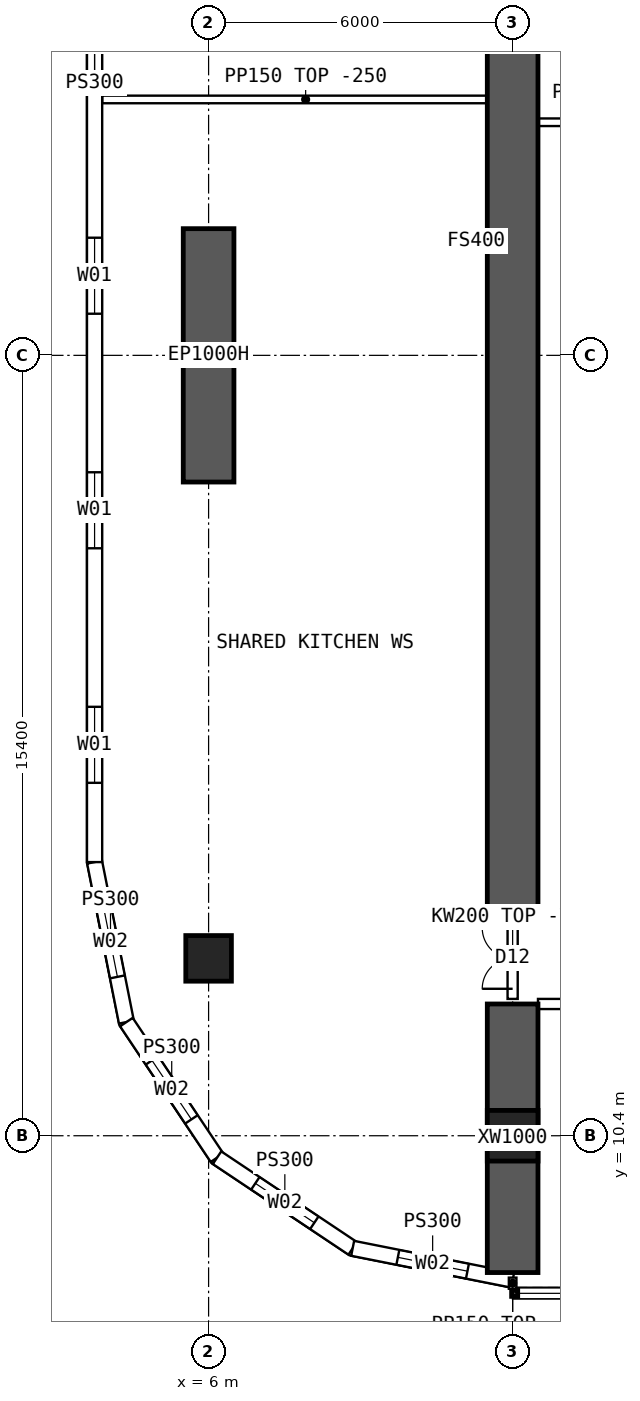
"""IFC4 building model, lengths in metres.
Left out: names, types, materials, properties, quantities, classifications, styles, units other than length and angle.
Written with IfcOpenShell. Run it as: python <this file> out.ifc"""

import sys

from ifc_helpers import new_model, si_unit, direction, frame, frame_2d, origin, origin_2d, place, context, subcontext, project, spatial, polyline, rectangle, hollow_rectangle, outline, extrude, element, fill, save


model = new_model("IFC4")
c1 = context("Model", 3, precision=1e-05, world=origin(), true_north=direction((0.0, 1.0)))
c2 = subcontext(c1, "Body", "Model", "MODEL_VIEW")
j1 = project(units=[si_unit("LENGTHUNIT", "METRE"), si_unit("PLANEANGLEUNIT", "RADIAN")], contexts=[c1])
p1 = place(None, origin())
s1 = spatial("IfcSite", under=j1, at=p1, CompositionType="ELEMENT")
p2 = place(p1, origin())
s2 = spatial("IfcBuilding", under=s1, at=p2, CompositionType="ELEMENT")
p3 = place(p2, frame((0.0, 0.0, 16.0)))
s3 = spatial("IfcBuildingStorey", under=s2, at=p3, CompositionType="ELEMENT", Elevation=16.0)
p4 = place(p3, frame((12.0, 10.4, 0.0), z_axis=(0.0, 0.0, 1.0), x_axis=(1.0, 0.0, 0.0)))
e1 = element("IfcColumn", 1, at=p4, inside=s3, PredefinedType="COLUMN", context=c2, shape_type="SweptSolid", body=[
    extrude(hollow_rectangle(XDim=1.0, YDim=1.0, WallThickness=0.1, at=origin_2d()), origin(), (0.0, 0.0, 1.0), 4.2),
])
p5 = place(p3, frame((6.0, 13.9, 0.0), z_axis=(0.0, 0.0, 1.0), x_axis=(1.0, 0.0, 0.0)))
e2 = element("IfcColumn", 2, at=p5, inside=s3, PredefinedType="COLUMN", context=c2, shape_type="SweptSolid", body=[
    extrude(hollow_rectangle(XDim=0.9, YDim=0.9, WallThickness=0.09, at=origin_2d()), origin(), (0.0, 0.0, 1.0), 4.2),
])
p6 = place(p3, frame((6.0, 23.3, 0.0), z_axis=(0.0, 0.0, 1.0), x_axis=(0.0, 1.0, 0.0)))
e3 = element("IfcWall", 3, at=p6, inside=s3, PredefinedType="SHEAR", context=c2, shape_type="SweptSolid", body=[
    extrude(rectangle(XDim=5.0, YDim=1.0, at=frame_2d((2.5, 0.0))), origin(), (0.0, 0.0, 1.0), 4.2),
])
p7 = place(p3, frame((12.0, 7.7, 0.0), z_axis=(0.0, 0.0, 1.0), x_axis=(0.0, 1.0, 0.0)))
e4 = element("IfcWall", 4, at=p7, inside=s3, PredefinedType="SHEAR", context=c2, shape_type="SweptSolid", body=[
    extrude(rectangle(XDim=5.3, YDim=1.0, at=frame_2d((2.65, 0.0))), origin(), (0.0, 0.0, 1.0), 4.2),
])
p8 = place(p3, frame((12.0, 14.8, 0.0), z_axis=(0.0, 0.0, 1.0), x_axis=(0.0, 1.0, 0.0)))
e5 = element("IfcWall", 5, at=p8, inside=s3, PredefinedType="SHEAR", context=c2, shape_type="SweptSolid", body=[
    extrude(rectangle(XDim=34.4, YDim=1.0, at=frame_2d((17.2, 0.0))), origin(), (0.0, 0.0, 1.0), 4.2),
])
p9 = place(p3, frame((3.75, 48.2, 0.0), z_axis=(0.0, 0.0, 1.0), x_axis=(0.0, -1.0, 0.0)))
e6 = element("IfcWall", 6, at=p9, inside=s3, PredefinedType="SOLIDWALL", context=c2, shape_type="SweptSolid", body=[
    extrude(outline(polyline([(-0.015, -0.15), (32.415, -0.15), (32.385, 0.15), (0.015, 0.15), (-0.015, -0.15)])), origin(), (0.0, 0.0, 1.0), 3.95),
])
p10 = place(p9, frame((1.564, 0.0, 0.9)))
e7 = element("IfcOpeningElement", 7, at=p10, cuts=e6, PredefinedType="OPENING", context=c2, shape_type="SweptSolid", body=[
    extrude(rectangle(XDim=1.5, YDim=2.0, at=frame_2d((0.75, 1.0))), frame((0.0, 0.16, 0.0), z_axis=(0.0, -1.0, 0.0), x_axis=(1.0, 0.0, 0.0)), (0.0, 0.0, 1.0), 0.32),
])
p11 = place(p9, frame((6.193, 0.0, 0.9)))
e8 = element("IfcOpeningElement", 8, at=p11, cuts=e6, PredefinedType="OPENING", context=c2, shape_type="SweptSolid", body=[
    extrude(rectangle(XDim=1.5, YDim=2.0, at=frame_2d((0.75, 1.0))), frame((0.0, 0.16, 0.0), z_axis=(0.0, -1.0, 0.0), x_axis=(1.0, 0.0, 0.0)), (0.0, 0.0, 1.0), 0.32),
])
p12 = place(p9, frame((10.822, 0.0, 0.9)))
e9 = element("IfcOpeningElement", 9, at=p12, cuts=e6, PredefinedType="OPENING", context=c2, shape_type="SweptSolid", body=[
    extrude(rectangle(XDim=1.5, YDim=2.0, at=frame_2d((0.75, 1.0))), frame((0.0, 0.16, 0.0), z_axis=(0.0, -1.0, 0.0), x_axis=(1.0, 0.0, 0.0)), (0.0, 0.0, 1.0), 0.32),
])
p13 = place(p9, frame((15.45, 0.0, 0.9)))
e10 = element("IfcOpeningElement", 10, at=p13, cuts=e6, PredefinedType="OPENING", context=c2, shape_type="SweptSolid", body=[
    extrude(rectangle(XDim=1.5, YDim=2.0, at=frame_2d((0.75, 1.0))), frame((0.0, 0.16, 0.0), z_axis=(0.0, -1.0, 0.0), x_axis=(1.0, 0.0, 0.0)), (0.0, 0.0, 1.0), 0.32),
])
p14 = place(p9, frame((20.079, 0.0, 0.9)))
e11 = element("IfcOpeningElement", 11, at=p14, cuts=e6, PredefinedType="OPENING", context=c2, shape_type="SweptSolid", body=[
    extrude(rectangle(XDim=1.5, YDim=2.0, at=frame_2d((0.75, 1.0))), frame((0.0, 0.16, 0.0), z_axis=(0.0, -1.0, 0.0), x_axis=(1.0, 0.0, 0.0)), (0.0, 0.0, 1.0), 0.32),
])
p15 = place(p9, frame((24.707, 0.0, 0.9)))
e12 = element("IfcOpeningElement", 12, at=p15, cuts=e6, PredefinedType="OPENING", context=c2, shape_type="SweptSolid", body=[
    extrude(rectangle(XDim=1.5, YDim=2.0, at=frame_2d((0.75, 1.0))), frame((0.0, 0.16, 0.0), z_axis=(0.0, -1.0, 0.0), x_axis=(1.0, 0.0, 0.0)), (0.0, 0.0, 1.0), 0.32),
])
p16 = place(p9, frame((29.336, 0.0, 0.9)))
e13 = element("IfcOpeningElement", 13, at=p16, cuts=e6, PredefinedType="OPENING", context=c2, shape_type="SweptSolid", body=[
    extrude(rectangle(XDim=1.5, YDim=2.0, at=frame_2d((0.75, 1.0))), frame((0.0, 0.16, 0.0), z_axis=(0.0, -1.0, 0.0), x_axis=(1.0, 0.0, 0.0)), (0.0, 0.0, 1.0), 0.32),
])
p17 = place(p3, frame((3.75, 15.8, 0.0), z_axis=(0.0, 0.0, 1.0), x_axis=(0.195065901187, -0.980790137692, 0.0)))
e14 = element("IfcWall", 14, at=p17, inside=s3, PredefinedType="SOLIDWALL", context=c2, shape_type="SweptSolid", body=[
    extrude(outline(polyline([(-0.015, -0.15), (3.249, -0.15), (3.189, 0.15), (0.015, 0.15), (-0.015, -0.15)])), origin(), (0.0, 0.0, 1.0), 3.95),
])
p18 = place(p17, frame((0.909, 0.0, 0.9)))
e15 = element("IfcOpeningElement", 15, at=p18, cuts=e14, PredefinedType="OPENING", context=c2, shape_type="SweptSolid", body=[
    extrude(rectangle(XDim=1.4, YDim=1.8, at=frame_2d((0.7, 0.9))), frame((0.0, 0.16, 0.0), z_axis=(0.0, -1.0, 0.0), x_axis=(1.0, 0.0, 0.0)), (0.0, 0.0, 1.0), 0.32),
])
p19 = place(p3, frame((4.378, 12.643, 0.0), z_axis=(0.0, 0.0, 1.0), x_axis=(0.555609954424, -0.831443069936, 0.0)))
e16 = element("IfcWall", 16, at=p19, inside=s3, PredefinedType="SOLIDWALL", context=c2, shape_type="SweptSolid", body=[
    extrude(outline(polyline([(-0.03, -0.15), (3.249, -0.15), (3.189, 0.15), (0.03, 0.15), (-0.03, -0.15)])), origin(), (0.0, 0.0, 1.0), 3.95),
])
p20 = place(p19, frame((0.909, 0.0, 0.9)))
e17 = element("IfcOpeningElement", 17, at=p20, cuts=e16, PredefinedType="OPENING", context=c2, shape_type="SweptSolid", body=[
    extrude(rectangle(XDim=1.4, YDim=1.8, at=frame_2d((0.7, 0.9))), frame((0.0, 0.16, 0.0), z_axis=(0.0, -1.0, 0.0), x_axis=(1.0, 0.0, 0.0)), (0.0, 0.0, 1.0), 0.32),
])
p21 = place(p3, frame((6.167, 9.966, 0.0), z_axis=(0.0, 0.0, 1.0), x_axis=(0.831478105043, -0.555557522525, 0.0)))
e18 = element("IfcWall", 18, at=p21, inside=s3, PredefinedType="SOLIDWALL", context=c2, shape_type="SweptSolid", body=[
    extrude(outline(polyline([(-0.03, -0.15), (3.249, -0.15), (3.189, 0.15), (0.03, 0.15), (-0.03, -0.15)])), origin(), (0.0, 0.0, 1.0), 3.95),
])
p22 = place(p21, frame((0.909, 0.0, 0.9)))
e19 = element("IfcOpeningElement", 19, at=p22, cuts=e18, PredefinedType="OPENING", context=c2, shape_type="SweptSolid", body=[
    extrude(rectangle(XDim=1.4, YDim=1.8, at=frame_2d((0.7, 0.9))), frame((0.0, 0.16, 0.0), z_axis=(0.0, -1.0, 0.0), x_axis=(1.0, 0.0, 0.0)), (0.0, 0.0, 1.0), 0.32),
])
p23 = place(p3, frame((8.843, 8.178, 0.0), z_axis=(0.0, 0.0, 1.0), x_axis=(0.980787251524, -0.195080412259, 0.0)))
e20 = element("IfcWall", 20, at=p23, inside=s3, PredefinedType="SOLIDWALL", context=c2, shape_type="SweptSolid", body=[
    extrude(outline(polyline([(-0.03, -0.15), (3.249, -0.15), (3.189, 0.15), (0.03, 0.15), (-0.03, -0.15)])), origin(), (0.0, 0.0, 1.0), 3.95),
])
p24 = place(p23, frame((0.909, 0.0, 0.9)))
e21 = element("IfcOpeningElement", 21, at=p24, cuts=e20, PredefinedType="OPENING", context=c2, shape_type="SweptSolid", body=[
    extrude(rectangle(XDim=1.4, YDim=1.8, at=frame_2d((0.7, 0.9))), frame((0.0, 0.16, 0.0), z_axis=(0.0, -1.0, 0.0), x_axis=(1.0, 0.0, 0.0)), (0.0, 0.0, 1.0), 0.32),
])
p25 = place(p3, frame((12.5, 13.0, 0.0), z_axis=(0.0, 0.0, 1.0), x_axis=(1.0, 0.0, 0.0)))
e22 = element("IfcWall", 22, at=p25, inside=s3, PredefinedType="SOLIDWALL", context=c2, shape_type="SweptSolid", body=[
    extrude(outline(polyline([(0.0, 0.0), (5.0, 0.0), (5.0, 3.55), (0.0, 3.55), (0.0, 0.0)])), frame((0.0, 0.1, 0.0), z_axis=(0.0, -1.0, 0.0), x_axis=(1.0, 0.0, 0.0)), (0.0, 0.0, 1.0), 0.2),
])
p26 = place(p25, frame((1.0, 0.0, 0.0)))
e23 = element("IfcOpeningElement", 23, at=p26, cuts=e22, PredefinedType="OPENING", context=c2, shape_type="SweptSolid", body=[
    extrude(rectangle(XDim=1.8, YDim=2.1, at=frame_2d((0.9, 1.05))), frame((0.0, 0.11, 0.0), z_axis=(0.0, -1.0, 0.0), x_axis=(1.0, 0.0, 0.0)), (0.0, 0.0, 1.0), 0.22),
])
p27 = place(p3, frame((12.5, 14.8, 0.0), z_axis=(0.0, 0.0, 1.0), x_axis=(1.0, 0.0, 0.0)))
e24 = element("IfcWall", 24, at=p27, inside=s3, PredefinedType="SOLIDWALL", context=c2, shape_type="SweptSolid", body=[
    extrude(rectangle(XDim=5.0, YDim=0.2, at=frame_2d((2.5, 0.0))), origin(), (0.0, 0.0, 1.0), 3.95),
])
p28 = place(p27, frame((3.3, 0.0, 0.0)))
e25 = element("IfcOpeningElement", 25, at=p28, cuts=e24, PredefinedType="OPENING", context=c2, shape_type="SweptSolid", body=[
    extrude(rectangle(XDim=1.6, YDim=2.1, at=frame_2d((0.8, 1.05))), frame((0.0, 0.11, 0.0), z_axis=(0.0, -1.0, 0.0), x_axis=(1.0, 0.0, 0.0)), (0.0, 0.0, 1.0), 0.22),
])
p29 = place(p3, frame((12.0, 30.4, 0.0), z_axis=(0.0, 0.0, 1.0), x_axis=(1.0, 0.0, 0.0)))
e26 = element("IfcWall", 26, at=p29, inside=s3, PredefinedType="PARTITIONING", context=c2, shape_type="SweptSolid", body=[
    extrude(rectangle(XDim=3.6, YDim=0.15, at=frame_2d((1.8, 0.0))), origin(), (0.0, 0.0, 1.0), 3.95),
])
p30 = place(p3, frame((3.905, 30.85, 0.0), z_axis=(0.0, 0.0, 1.0), x_axis=(1.0, 0.0, 0.0)))
e27 = element("IfcWall", 27, at=p30, inside=s3, PredefinedType="PARTITIONING", context=c2, shape_type="SweptSolid", body=[
    extrude(outline(polyline([(0.0, 0.0), (8.02, 0.0), (8.02, 3.95), (2.397, 3.95), (2.395, 3.5), (1.797, 3.5), (1.795, 3.95), (0.0, 3.95), (0.0, 0.0)])), frame((0.0, 0.075, 0.0), z_axis=(0.0, -1.0, 0.0), x_axis=(1.0, 0.0, 0.0)), (0.0, 0.0, 1.0), 0.15),
])
p31 = place(p3, frame((12.0, 13.1, 0.0), z_axis=(0.0, 0.0, 1.0), x_axis=(0.0, 1.0, 0.0)))
e28 = element("IfcWall", 28, at=p31, inside=s3, PredefinedType="SOLIDWALL", context=c2, shape_type="SweptSolid", body=[
    extrude(outline(polyline([(0.0, 0.0), (1.6, 0.0), (1.6, 3.5), (0.0, 3.5), (0.0, 0.0)])), frame((0.0, 0.1, 0.0), z_axis=(0.0, -1.0, 0.0), x_axis=(1.0, 0.0, 0.0)), (0.0, 0.0, 1.0), 0.2),
])
p32 = place(p31, frame((0.2, 0.0, 0.0)))
e29 = element("IfcOpeningElement", 29, at=p32, cuts=e28, PredefinedType="OPENING", context=c2, shape_type="SweptSolid", body=[
    extrude(rectangle(XDim=1.2, YDim=2.1, at=frame_2d((0.6, 1.05))), frame((0.0, 0.11, 0.0), z_axis=(0.0, -1.0, 0.0), x_axis=(1.0, 0.0, 0.0)), (0.0, 0.0, 1.0), 0.22),
])
p33 = place(p3, frame((12.0, 7.6, 0.0), z_axis=(0.0, 0.0, 1.0), x_axis=(0.0, -1.0, 0.0)))
e30 = element("IfcWall", 30, at=p33, inside=s3, PredefinedType="PARTITIONING", context=c2, shape_type="SweptSolid", body=[
    extrude(rectangle(XDim=0.22, YDim=0.15, at=frame_2d((0.11, 0.0))), origin(), (0.0, 0.0, 1.0), 3.95),
])
p34 = place(p13, origin())
e31 = element("IfcWindow", 31, at=p34, inside=s3, PartitioningType="SINGLE_PANEL", PredefinedType="WINDOW", context=c2, shape_type="SweptSolid", body=[
    extrude(rectangle(XDim=1.5, YDim=2.0, at=frame_2d((0.75, 1.0))), frame((0.0, 0.03, 0.0), z_axis=(0.0, -1.0, 0.0), x_axis=(1.0, 0.0, 0.0)), (0.0, 0.0, 1.0), 0.06),
])
fill(e10, e31)
p35 = place(p14, origin())
e32 = element("IfcWindow", 32, at=p35, inside=s3, PartitioningType="SINGLE_PANEL", PredefinedType="WINDOW", context=c2, shape_type="SweptSolid", body=[
    extrude(rectangle(XDim=1.5, YDim=2.0, at=frame_2d((0.75, 1.0))), frame((0.0, 0.03, 0.0), z_axis=(0.0, -1.0, 0.0), x_axis=(1.0, 0.0, 0.0)), (0.0, 0.0, 1.0), 0.06),
])
fill(e11, e32)
p36 = place(p15, origin())
e33 = element("IfcWindow", 33, at=p36, inside=s3, PartitioningType="SINGLE_PANEL", PredefinedType="WINDOW", context=c2, shape_type="SweptSolid", body=[
    extrude(rectangle(XDim=1.5, YDim=2.0, at=frame_2d((0.75, 1.0))), frame((0.0, 0.03, 0.0), z_axis=(0.0, -1.0, 0.0), x_axis=(1.0, 0.0, 0.0)), (0.0, 0.0, 1.0), 0.06),
])
fill(e12, e33)
p37 = place(p16, origin())
e34 = element("IfcWindow", 34, at=p37, inside=s3, PartitioningType="SINGLE_PANEL", PredefinedType="WINDOW", context=c2, shape_type="SweptSolid", body=[
    extrude(rectangle(XDim=1.5, YDim=2.0, at=frame_2d((0.75, 1.0))), frame((0.0, 0.03, 0.0), z_axis=(0.0, -1.0, 0.0), x_axis=(1.0, 0.0, 0.0)), (0.0, 0.0, 1.0), 0.06),
])
fill(e13, e34)
p38 = place(p18, origin())
e35 = element("IfcWindow", 35, at=p38, inside=s3, PartitioningType="SINGLE_PANEL", PredefinedType="WINDOW", context=c2, shape_type="SweptSolid", body=[
    extrude(rectangle(XDim=1.4, YDim=1.8, at=frame_2d((0.7, 0.9))), frame((0.0, 0.03, 0.0), z_axis=(0.0, -1.0, 0.0), x_axis=(1.0, 0.0, 0.0)), (0.0, 0.0, 1.0), 0.06),
])
fill(e15, e35)
p39 = place(p20, origin())
e36 = element("IfcWindow", 36, at=p39, inside=s3, PartitioningType="SINGLE_PANEL", PredefinedType="WINDOW", context=c2, shape_type="SweptSolid", body=[
    extrude(rectangle(XDim=1.4, YDim=1.8, at=frame_2d((0.7, 0.9))), frame((0.0, 0.03, 0.0), z_axis=(0.0, -1.0, 0.0), x_axis=(1.0, 0.0, 0.0)), (0.0, 0.0, 1.0), 0.06),
])
fill(e17, e36)
p40 = place(p22, origin())
e37 = element("IfcWindow", 37, at=p40, inside=s3, PartitioningType="SINGLE_PANEL", PredefinedType="WINDOW", context=c2, shape_type="SweptSolid", body=[
    extrude(rectangle(XDim=1.4, YDim=1.8, at=frame_2d((0.7, 0.9))), frame((0.0, 0.03, 0.0), z_axis=(0.0, -1.0, 0.0), x_axis=(1.0, 0.0, 0.0)), (0.0, 0.0, 1.0), 0.06),
])
fill(e19, e37)
p41 = place(p24, origin())
e38 = element("IfcWindow", 38, at=p41, inside=s3, PartitioningType="SINGLE_PANEL", PredefinedType="WINDOW", context=c2, shape_type="SweptSolid", body=[
    extrude(rectangle(XDim=1.4, YDim=1.8, at=frame_2d((0.7, 0.9))), frame((0.0, 0.03, 0.0), z_axis=(0.0, -1.0, 0.0), x_axis=(1.0, 0.0, 0.0)), (0.0, 0.0, 1.0), 0.06),
])
fill(e21, e38)
p42 = place(p32, origin())
e39 = element("IfcDoor", 39, at=p42, inside=s3, OperationType="DOUBLE_DOOR_SINGLE_SWING", PredefinedType="DOOR", context=c2, shape_type="SweptSolid", body=[
    extrude(rectangle(XDim=1.2, YDim=2.1, at=frame_2d((0.6, 1.05))), frame((0.0, 0.025, 0.0), z_axis=(0.0, -1.0, 0.0), x_axis=(1.0, 0.0, 0.0)), (0.0, 0.0, 1.0), 0.05),
])
fill(e29, e39)
save(model, sys.argv[1])
